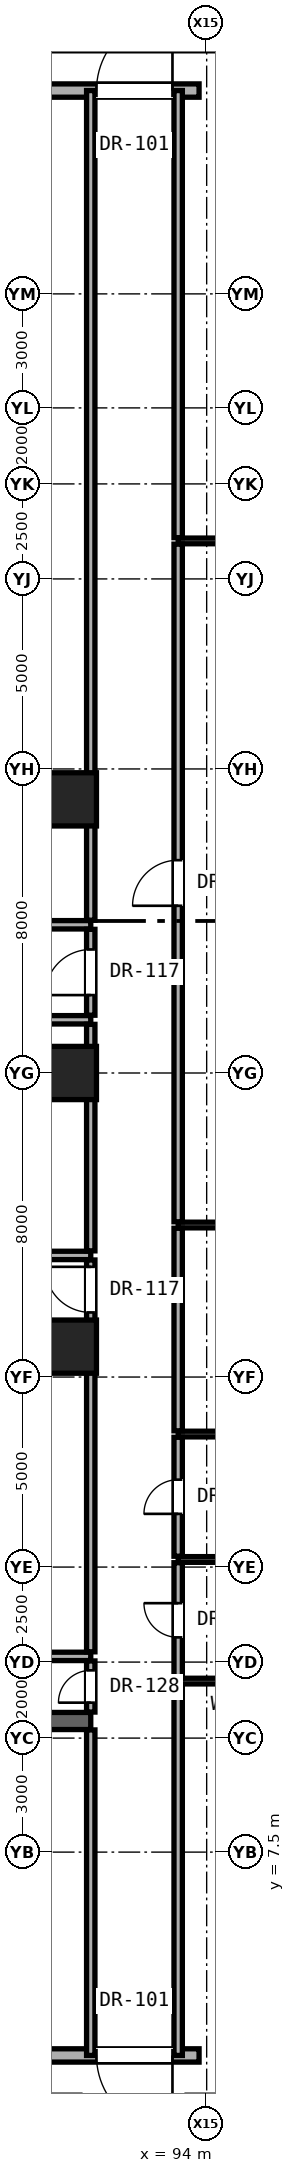
"""IFC4 building model, lengths in metres.
Left out: names, types, materials, properties, quantities, classifications, styles, units other than length and angle.
Written with IfcOpenShell. Run it as: python <this file> out.ifc"""

import sys

from ifc_helpers import new_model, si_unit, direction, frame, frame_2d, origin, origin_2d, place, context, subcontext, project, spatial, rectangle, hollow_rectangle, extrude, element, fill, save


model = new_model("IFC4")
c1 = context("Model", 3, precision=1e-05, world=origin(), true_north=direction((0.0, 1.0)))
c2 = subcontext(c1, "Body", "Model", "MODEL_VIEW")
j1 = project(units=[si_unit("LENGTHUNIT", "METRE"), si_unit("PLANEANGLEUNIT", "RADIAN")], contexts=[c1])
p1 = place(None, origin())
s1 = spatial("IfcSite", under=j1, at=p1, CompositionType="ELEMENT")
p2 = place(p1, origin())
s2 = spatial("IfcBuilding", under=s1, at=p2, CompositionType="ELEMENT")
p3 = place(p2, origin())
s3 = spatial("IfcBuildingStorey", under=s2, at=p3, CompositionType="ELEMENT", Elevation=0.0)
for number, where, z_axis, x_axis in (
    (1, (90.4, 20.8, 0.0), (0.0, 0.0, 1.0), (1.0, 0.0, 0.0)),
    (2, (90.4, 28.0, 0.0), (0.0, 0.0, 1.0), (1.0, 0.0, 0.0)),
    (3, (90.4, 35.2, 0.0), (0.0, 0.0, 1.0), (1.0, 0.0, 0.0)),
):
    element("IfcColumn", number, at=place(p3, frame(where, z_axis=z_axis, x_axis=x_axis)), inside=s3, PredefinedType="COLUMN", context=c2, shape_type="SweptSolid", body=[
        extrude(hollow_rectangle(XDim=1.4, YDim=1.4, WallThickness=0.08, at=origin_2d()), origin(), (0.0, 0.0, 1.0), 5.2),
    ])
p4 = place(p3, frame((93.8, 2.15, 0.0), z_axis=(0.0, 0.0, 1.0), x_axis=(-1.0, 0.0, 0.0)))
e4 = element("IfcWall", 4, at=p4, inside=s3, PredefinedType="SOLIDWALL", context=c2, shape_type="SweptSolid", body=[
    extrude(rectangle(XDim=29.4, YDim=0.35, at=frame_2d((14.7, 0.0))), origin(), (0.0, 0.0, 1.0), 4.86),
])
p5 = place(p4, frame((17.8, 0.0, 0.85)))
e5 = element("IfcOpeningElement", 5, at=p5, cuts=e4, PredefinedType="OPENING", context=c2, shape_type="SweptSolid", body=[
    extrude(rectangle(XDim=2.4, YDim=2.6, at=frame_2d((1.2, 1.3))), frame((0.0, 0.185, 0.0), z_axis=(0.0, -1.0, 0.0), x_axis=(1.0, 0.0, 0.0)), (0.0, 0.0, 1.0), 0.37),
])
p6 = place(p4, frame((21.0, 0.0, 0.85)))
e6 = element("IfcOpeningElement", 6, at=p6, cuts=e4, PredefinedType="OPENING", context=c2, shape_type="SweptSolid", body=[
    extrude(rectangle(XDim=1.8, YDim=2.4, at=frame_2d((0.9, 1.2))), frame((0.0, 0.185, 0.0), z_axis=(0.0, -1.0, 0.0), x_axis=(1.0, 0.0, 0.0)), (0.0, 0.0, 1.0), 0.37),
])
p7 = place(p4, frame((0.7, 0.0, 0.0)))
e7 = element("IfcOpeningElement", 7, at=p7, cuts=e4, PredefinedType="OPENING", context=c2, shape_type="SweptSolid", body=[
    extrude(rectangle(XDim=2.0, YDim=2.4, at=frame_2d((1.0, 1.2))), frame((0.0, 0.185, 0.0), z_axis=(0.0, -1.0, 0.0), x_axis=(1.0, 0.0, 0.0)), (0.0, 0.0, 1.0), 0.37),
])
p8 = place(p4, frame((11.0, 0.0, 0.0)))
e8 = element("IfcOpeningElement", 8, at=p8, cuts=e4, PredefinedType="OPENING", context=c2, shape_type="SweptSolid", body=[
    extrude(rectangle(XDim=1.8, YDim=2.5, at=frame_2d((0.9, 1.25))), frame((0.0, 0.185, 0.0), z_axis=(0.0, -1.0, 0.0), x_axis=(1.0, 0.0, 0.0)), (0.0, 0.0, 1.0), 0.37),
])
p9 = place(p4, frame((25.85, 0.0, 0.0)))
e9 = element("IfcOpeningElement", 9, at=p9, cuts=e4, PredefinedType="OPENING", context=c2, shape_type="SweptSolid", body=[
    extrude(rectangle(XDim=2.0, YDim=2.4, at=frame_2d((1.0, 1.2))), frame((0.0, 0.185, 0.0), z_axis=(0.0, -1.0, 0.0), x_axis=(1.0, 0.0, 0.0)), (0.0, 0.0, 1.0), 0.37),
])
p10 = place(p3, frame((66.2, 53.85, 0.0), z_axis=(0.0, 0.0, 1.0), x_axis=(1.0, 0.0, 0.0)))
e10 = element("IfcWall", 10, at=p10, inside=s3, PredefinedType="SOLIDWALL", context=c2, shape_type="SweptSolid", body=[
    extrude(rectangle(XDim=27.6, YDim=0.35, at=frame_2d((13.8, 0.0))), origin(), (0.0, 0.0, 1.0), 4.86),
])
p11 = place(p10, frame((10.0, 0.0, 0.85)))
e11 = element("IfcOpeningElement", 11, at=p11, cuts=e10, PredefinedType="OPENING", context=c2, shape_type="SweptSolid", body=[
    extrude(rectangle(XDim=1.8, YDim=2.4, at=frame_2d((0.9, 1.2))), frame((0.0, 0.185, 0.0), z_axis=(0.0, -1.0, 0.0), x_axis=(1.0, 0.0, 0.0)), (0.0, 0.0, 1.0), 0.37),
])
p12 = place(p10, frame((15.0, 0.0, 0.85)))
e12 = element("IfcOpeningElement", 12, at=p12, cuts=e10, PredefinedType="OPENING", context=c2, shape_type="SweptSolid", body=[
    extrude(rectangle(XDim=2.4, YDim=2.6, at=frame_2d((1.2, 1.3))), frame((0.0, 0.185, 0.0), z_axis=(0.0, -1.0, 0.0), x_axis=(1.0, 0.0, 0.0)), (0.0, 0.0, 1.0), 0.37),
])
p13 = place(p10, frame((5.8, 0.0, 0.0)))
e13 = element("IfcOpeningElement", 13, at=p13, cuts=e10, PredefinedType="OPENING", context=c2, shape_type="SweptSolid", body=[
    extrude(rectangle(XDim=2.0, YDim=2.4, at=frame_2d((1.0, 1.2))), frame((0.0, 0.185, 0.0), z_axis=(0.0, -1.0, 0.0), x_axis=(1.0, 0.0, 0.0)), (0.0, 0.0, 1.0), 0.37),
])
p14 = place(p10, frame((24.9, 0.0, 0.0)))
e14 = element("IfcOpeningElement", 14, at=p14, cuts=e10, PredefinedType="OPENING", context=c2, shape_type="SweptSolid", body=[
    extrude(rectangle(XDim=2.0, YDim=2.4, at=frame_2d((1.0, 1.2))), frame((0.0, 0.185, 0.0), z_axis=(0.0, -1.0, 0.0), x_axis=(1.0, 0.0, 0.0)), (0.0, 0.0, 1.0), 0.37),
])
p15 = place(p3, frame((61.8, 10.95, 0.0), z_axis=(0.0, 0.0, 1.0), x_axis=(1.0, 0.0, 0.0)))
e15 = element("IfcWall", 15, at=p15, inside=s3, PredefinedType="SHEAR", context=c2, shape_type="SweptSolid", body=[
    extrude(rectangle(XDim=29.15, YDim=0.45, at=frame_2d((14.575, 0.0))), origin(), (0.0, 0.0, 1.0), 4.88),
])
p16 = place(p15, frame((4.55, 0.0, 0.0)))
e16 = element("IfcOpeningElement", 16, at=p16, cuts=e15, PredefinedType="OPENING", context=c2, shape_type="SweptSolid", body=[
    extrude(rectangle(XDim=1.2, YDim=2.25, at=frame_2d((0.6, 1.125))), frame((0.0, 0.235, 0.0), z_axis=(0.0, -1.0, 0.0), x_axis=(1.0, 0.0, 0.0)), (0.0, 0.0, 1.0), 0.47),
])
p17 = place(p15, frame((7.57, 0.0, 0.0)))
e17 = element("IfcOpeningElement", 17, at=p17, cuts=e15, PredefinedType="OPENING", context=c2, shape_type="SweptSolid", body=[
    extrude(rectangle(XDim=1.15, YDim=2.2, at=frame_2d((0.575, 1.1))), frame((0.0, 0.235, 0.0), z_axis=(0.0, -1.0, 0.0), x_axis=(1.0, 0.0, 0.0)), (0.0, 0.0, 1.0), 0.47),
])
p18 = place(p15, frame((21.555, 0.0, 0.0)))
e18 = element("IfcOpeningElement", 18, at=p18, cuts=e15, PredefinedType="OPENING", context=c2, shape_type="SweptSolid", body=[
    extrude(rectangle(XDim=1.2, YDim=2.25, at=frame_2d((0.6, 1.125))), frame((0.0, 0.235, 0.0), z_axis=(0.0, -1.0, 0.0), x_axis=(1.0, 0.0, 0.0)), (0.0, 0.0, 1.0), 0.47),
])
p19 = place(p3, frame((93.25, 12.0, 0.0), z_axis=(0.0, 0.0, 1.0), x_axis=(1.0, 0.0, 0.0)))
e19 = element("IfcWall", 19, at=p19, inside=s3, PredefinedType="PARTITIONING", context=c2, shape_type="SweptSolid", body=[
    extrude(rectangle(XDim=3.55, YDim=0.15, at=frame_2d((1.775, 0.0))), origin(), (0.0, 0.0, 1.0), 4.88),
])
p20 = place(p3, frame((61.8, 12.65, 0.0), z_axis=(0.0, 0.0, 1.0), x_axis=(1.0, 0.0, 0.0)))
e20 = element("IfcWall", 20, at=p20, inside=s3, PredefinedType="SOLIDWALL", context=c2, shape_type="SweptSolid", body=[
    extrude(rectangle(XDim=29.15, YDim=0.22, at=frame_2d((14.575, 0.0))), origin(), (0.0, 0.0, 1.0), 4.016),
])
for number, where, z_axis, x_axis in (
    (21, (93.25, 15.2, 0.0), (0.0, 0.0, 1.0), (1.0, 0.0, 0.0)),
    (22, (93.25, 18.5, 0.0), (0.0, 0.0, 1.0), (1.0, 0.0, 0.0)),
):
    element("IfcWall", number, at=place(p3, frame(where, z_axis=z_axis, x_axis=x_axis)), inside=s3, PredefinedType="PARTITIONING", context=c2, shape_type="SweptSolid", body=[
        extrude(rectangle(XDim=3.55, YDim=0.15, at=frame_2d((1.775, 0.0))), origin(), (0.0, 0.0, 1.0), 4.016),
    ])
p21 = place(p3, frame((85.37, 20.8, 0.0), z_axis=(0.0, 0.0, 1.0), x_axis=(1.0, 0.0, 0.0)))
e23 = element("IfcWall", 23, at=p21, inside=s3, PredefinedType="SOLIDWALL", context=c2, shape_type="SweptSolid", body=[
    extrude(rectangle(XDim=5.58, YDim=0.22, at=frame_2d((2.79, 0.0))), origin(), (0.0, 0.0, 1.0), 3.772),
])
p22 = place(p3, frame((61.8, 23.2, 0.0), z_axis=(0.0, 0.0, 1.0), x_axis=(1.0, 0.0, 0.0)))
e24 = element("IfcWall", 24, at=p22, inside=s3, PredefinedType="SOLIDWALL", context=c2, shape_type="SweptSolid", body=[
    extrude(rectangle(XDim=29.15, YDim=0.22, at=frame_2d((14.575, 0.0))), origin(), (0.0, 0.0, 1.0), 3.945),
])
p23 = place(p22, frame((6.225, 0.0, 0.0)))
e25 = element("IfcOpeningElement", 25, at=p23, cuts=e24, PredefinedType="OPENING", context=c2, shape_type="SweptSolid", body=[
    extrude(rectangle(XDim=0.9, YDim=2.1, at=frame_2d((0.45, 1.05))), frame((0.0, 0.12, 0.0), z_axis=(0.0, -1.0, 0.0), x_axis=(1.0, 0.0, 0.0)), (0.0, 0.0, 1.0), 0.24),
])
p24 = place(p22, frame((15.075, 0.0, 0.0)))
e26 = element("IfcOpeningElement", 26, at=p24, cuts=e24, PredefinedType="OPENING", context=c2, shape_type="SweptSolid", body=[
    extrude(rectangle(XDim=1.2, YDim=2.25, at=frame_2d((0.6, 1.125))), frame((0.0, 0.12, 0.0), z_axis=(0.0, -1.0, 0.0), x_axis=(1.0, 0.0, 0.0)), (0.0, 0.0, 1.0), 0.24),
])
p25 = place(p3, frame((93.25, 24.0, 0.0), z_axis=(0.0, 0.0, 1.0), x_axis=(1.0, 0.0, 0.0)))
e27 = element("IfcWall", 27, at=p25, inside=s3, PredefinedType="PARTITIONING", context=c2, shape_type="SweptSolid", body=[
    extrude(rectangle(XDim=4.15, YDim=0.15, at=frame_2d((2.075, 0.0))), origin(), (0.0, 0.0, 1.0), 4.016),
])
p26 = place(p3, frame((85.22, 29.4, 0.0), z_axis=(0.0, 0.0, 1.0), x_axis=(1.0, 0.0, 0.0)))
e28 = element("IfcWall", 28, at=p26, inside=s3, PredefinedType="SOLIDWALL", context=c2, shape_type="SweptSolid", body=[
    extrude(rectangle(XDim=5.73, YDim=0.22, at=frame_2d((2.865, 0.0))), origin(), (0.0, 0.0, 1.0), 4.016),
])
p27 = place(p3, frame((61.8, 31.9, 0.0), z_axis=(0.0, 0.0, 1.0), x_axis=(1.0, 0.0, 0.0)))
e29 = element("IfcWall", 29, at=p27, inside=s3, PredefinedType="SOLIDWALL", context=c2, shape_type="SweptSolid", body=[
    extrude(rectangle(XDim=29.15, YDim=0.22, at=frame_2d((14.575, 0.0))), origin(), (0.0, 0.0, 1.0), 3.945),
])
p28 = place(p27, frame((7.6, 0.0, 0.0)))
e30 = element("IfcOpeningElement", 30, at=p28, cuts=e29, PredefinedType="OPENING", context=c2, shape_type="SweptSolid", body=[
    extrude(rectangle(XDim=1.2, YDim=2.25, at=frame_2d((0.6, 1.125))), frame((0.0, 0.12, 0.0), z_axis=(0.0, -1.0, 0.0), x_axis=(1.0, 0.0, 0.0)), (0.0, 0.0, 1.0), 0.24),
])
p29 = place(p27, frame((20.26, 0.0, 0.0)))
e31 = element("IfcOpeningElement", 31, at=p29, cuts=e29, PredefinedType="OPENING", context=c2, shape_type="SweptSolid", body=[
    extrude(rectangle(XDim=1.2, YDim=2.25, at=frame_2d((0.6, 1.125))), frame((0.0, 0.12, 0.0), z_axis=(0.0, -1.0, 0.0), x_axis=(1.0, 0.0, 0.0)), (0.0, 0.0, 1.0), 0.24),
])
p30 = place(p27, frame((15.64, 0.0, 0.0)))
e32 = element("IfcOpeningElement", 32, at=p30, cuts=e29, PredefinedType="OPENING", context=c2, shape_type="SweptSolid", body=[
    extrude(rectangle(XDim=1.2, YDim=2.25, at=frame_2d((0.6, 1.125))), frame((0.0, 0.12, 0.0), z_axis=(0.0, -1.0, 0.0), x_axis=(1.0, 0.0, 0.0)), (0.0, 0.0, 1.0), 0.24),
])
p31 = place(p3, frame((93.25, 42.0, 0.0), z_axis=(0.0, 0.0, 1.0), x_axis=(1.0, 0.0, 0.0)))
e33 = element("IfcWall", 33, at=p31, inside=s3, PredefinedType="PARTITIONING", context=c2, shape_type="SweptSolid", body=[
    extrude(rectangle(XDim=4.15, YDim=0.15, at=frame_2d((2.075, 0.0))), origin(), (0.0, 0.0, 1.0), 4.88),
])
p32 = place(p3, frame((90.95, 2.15, 0.0), z_axis=(0.0, 0.0, 1.0), x_axis=(0.0, 1.0, 0.0)))
e34 = element("IfcWall", 34, at=p32, inside=s3, PredefinedType="SOLIDWALL", context=c2, shape_type="SweptSolid", body=[
    extrude(rectangle(XDim=8.565, YDim=0.22, at=frame_2d((4.283, 0.0))), origin(), (0.0, 0.0, 1.0), 4.88),
])
p33 = place(p3, frame((90.95, 11.185, 0.0), z_axis=(0.0, 0.0, 1.0), x_axis=(0.0, 1.0, 0.0)))
e35 = element("IfcWall", 35, at=p33, inside=s3, PredefinedType="SOLIDWALL", context=c2, shape_type="SweptSolid", body=[
    extrude(rectangle(XDim=1.345, YDim=0.22, at=frame_2d((0.672, 0.0))), origin(), (0.0, 0.0, 1.0), 4.88),
])
p34 = place(p33, frame((0.248, 0.0, 0.0)))
e36 = element("IfcOpeningElement", 36, at=p34, cuts=e35, PredefinedType="OPENING", context=c2, shape_type="SweptSolid", body=[
    extrude(rectangle(XDim=0.85, YDim=2.01, at=frame_2d((0.425, 1.005))), frame((0.0, 0.12, 0.0), z_axis=(0.0, -1.0, 0.0), x_axis=(1.0, 0.0, 0.0)), (0.0, 0.0, 1.0), 0.24),
])
p35 = place(p3, frame((90.95, 12.77, 0.0), z_axis=(0.0, 0.0, 1.0), x_axis=(0.0, 1.0, 0.0)))
e37 = element("IfcWall", 37, at=p35, inside=s3, PredefinedType="SOLIDWALL", context=c2, shape_type="SweptSolid", body=[
    extrude(rectangle(XDim=7.91, YDim=0.22, at=frame_2d((3.955, 0.0))), origin(), (0.0, 0.0, 1.0), 4.016),
])
p36 = place(p3, frame((90.95, 20.92, 0.0), z_axis=(0.0, 0.0, 1.0), x_axis=(0.0, 1.0, 0.0)))
e38 = element("IfcWall", 38, at=p36, inside=s3, PredefinedType="SOLIDWALL", context=c2, shape_type="SweptSolid", body=[
    extrude(rectangle(XDim=2.16, YDim=0.22, at=frame_2d((1.08, 0.0))), origin(), (0.0, 0.0, 1.0), 4.88),
])
p37 = place(p36, frame((0.78, 0.0, 0.0)))
e39 = element("IfcOpeningElement", 39, at=p37, cuts=e38, PredefinedType="OPENING", context=c2, shape_type="SweptSolid", body=[
    extrude(rectangle(XDim=1.2, YDim=2.25, at=frame_2d((0.6, 1.125))), frame((0.0, 0.12, 0.0), z_axis=(0.0, -1.0, 0.0), x_axis=(1.0, 0.0, 0.0)), (0.0, 0.0, 1.0), 0.24),
])
p38 = place(p3, frame((90.95, 23.32, 0.0), z_axis=(0.0, 0.0, 1.0), x_axis=(0.0, 1.0, 0.0)))
e40 = element("IfcWall", 40, at=p38, inside=s3, PredefinedType="SOLIDWALL", context=c2, shape_type="SweptSolid", body=[
    extrude(rectangle(XDim=5.96, YDim=0.22, at=frame_2d((2.98, 0.0))), origin(), (0.0, 0.0, 1.0), 4.099),
])
p39 = place(p3, frame((90.95, 29.52, 0.0), z_axis=(0.0, 0.0, 1.0), x_axis=(0.0, 1.0, 0.0)))
e41 = element("IfcWall", 41, at=p39, inside=s3, PredefinedType="SOLIDWALL", context=c2, shape_type="SweptSolid", body=[
    extrude(rectangle(XDim=2.26, YDim=0.22, at=frame_2d((1.13, 0.0))), origin(), (0.0, 0.0, 1.0), 4.88),
])
p40 = place(p39, frame((0.53, 0.0, 0.0)))
e42 = element("IfcOpeningElement", 42, at=p40, cuts=e41, PredefinedType="OPENING", context=c2, shape_type="SweptSolid", body=[
    extrude(rectangle(XDim=1.2, YDim=2.25, at=frame_2d((0.6, 1.125))), frame((0.0, 0.12, 0.0), z_axis=(0.0, -1.0, 0.0), x_axis=(1.0, 0.0, 0.0)), (0.0, 0.0, 1.0), 0.24),
])
p41 = place(p3, frame((90.95, 32.02, 0.0), z_axis=(0.0, 0.0, 1.0), x_axis=(0.0, 1.0, 0.0)))
e43 = element("IfcWall", 43, at=p41, inside=s3, PredefinedType="SOLIDWALL", context=c2, shape_type="SweptSolid", body=[
    extrude(rectangle(XDim=21.83, YDim=0.22, at=frame_2d((10.915, 0.0))), origin(), (0.0, 0.0, 1.0), 4.016),
])
p42 = place(p3, frame((93.25, 2.15, 0.0), z_axis=(0.0, 0.0, 1.0), x_axis=(0.0, 1.0, 0.0)))
e44 = element("IfcWall", 44, at=p42, inside=s3, PredefinedType="SOLIDWALL", context=c2, shape_type="SweptSolid", body=[
    extrude(rectangle(XDim=9.765, YDim=0.22, at=frame_2d((4.883, 0.0))), origin(), (0.0, 0.0, 1.0), 4.88),
])
p43 = place(p3, frame((93.25, 12.085, 0.0), z_axis=(0.0, 0.0, 1.0), x_axis=(0.0, 1.0, 0.0)))
e45 = element("IfcWall", 45, at=p43, inside=s3, PredefinedType="SOLIDWALL", context=c2, shape_type="SweptSolid", body=[
    extrude(rectangle(XDim=3.03, YDim=0.22, at=frame_2d((1.515, 0.0))), origin(), (0.0, 0.0, 1.0), 4.016),
])
p44 = place(p43, frame((1.065, 0.0, 0.0)))
e46 = element("IfcOpeningElement", 46, at=p44, cuts=e45, PredefinedType="OPENING", context=c2, shape_type="SweptSolid", body=[
    extrude(rectangle(XDim=0.9, YDim=2.1, at=frame_2d((0.45, 1.05))), frame((0.0, 0.12, 0.0), z_axis=(0.0, -1.0, 0.0), x_axis=(1.0, 0.0, 0.0)), (0.0, 0.0, 1.0), 0.24),
])
p45 = place(p3, frame((93.25, 15.285, 0.0), z_axis=(0.0, 0.0, 1.0), x_axis=(0.0, 1.0, 0.0)))
e47 = element("IfcWall", 47, at=p45, inside=s3, PredefinedType="SOLIDWALL", context=c2, shape_type="SweptSolid", body=[
    extrude(rectangle(XDim=3.13, YDim=0.22, at=frame_2d((1.565, 0.0))), origin(), (0.0, 0.0, 1.0), 4.016),
])
p46 = place(p45, frame((1.115, 0.0, 0.0)))
e48 = element("IfcOpeningElement", 48, at=p46, cuts=e47, PredefinedType="OPENING", context=c2, shape_type="SweptSolid", body=[
    extrude(rectangle(XDim=0.9, YDim=2.1, at=frame_2d((0.45, 1.05))), frame((0.0, 0.12, 0.0), z_axis=(0.0, -1.0, 0.0), x_axis=(1.0, 0.0, 0.0)), (0.0, 0.0, 1.0), 0.24),
])
p47 = place(p3, frame((93.25, 18.585, 0.0), z_axis=(0.0, 0.0, 1.0), x_axis=(0.0, 1.0, 0.0)))
e49 = element("IfcWall", 49, at=p47, inside=s3, PredefinedType="SOLIDWALL", context=c2, shape_type="SweptSolid", body=[
    extrude(rectangle(XDim=5.33, YDim=0.22, at=frame_2d((2.665, 0.0))), origin(), (0.0, 0.0, 1.0), 4.88),
])
p48 = place(p3, frame((93.25, 24.085, 0.0), z_axis=(0.0, 0.0, 1.0), x_axis=(0.0, 1.0, 0.0)))
e50 = element("IfcWall", 50, at=p48, inside=s3, PredefinedType="SOLIDWALL", context=c2, shape_type="SweptSolid", body=[
    extrude(rectangle(XDim=17.83, YDim=0.22, at=frame_2d((8.915, 0.0))), origin(), (0.0, 0.0, 1.0), 4.016),
])
p49 = place(p48, frame((8.315, 0.0, 0.0)))
e51 = element("IfcOpeningElement", 51, at=p49, cuts=e50, PredefinedType="OPENING", context=c2, shape_type="SweptSolid", body=[
    extrude(rectangle(XDim=1.2, YDim=2.25, at=frame_2d((0.6, 1.125))), frame((0.0, 0.12, 0.0), z_axis=(0.0, -1.0, 0.0), x_axis=(1.0, 0.0, 0.0)), (0.0, 0.0, 1.0), 0.24),
])
p50 = place(p3, frame((93.25, 42.085, 0.0), z_axis=(0.0, 0.0, 1.0), x_axis=(0.0, 1.0, 0.0)))
e52 = element("IfcWall", 52, at=p50, inside=s3, PredefinedType="SOLIDWALL", context=c2, shape_type="SweptSolid", body=[
    extrude(rectangle(XDim=11.765, YDim=0.22, at=frame_2d((5.883, 0.0))), origin(), (0.0, 0.0, 1.0), 4.88),
])
p51 = place(p7, origin())
e53 = element("IfcDoor", 53, at=p51, inside=s3, OperationType="SINGLE_SWING_LEFT", PredefinedType="DOOR", context=c2, shape_type="SweptSolid", body=[
    extrude(rectangle(XDim=2.0, YDim=2.4, at=frame_2d((1.0, 1.2))), frame((0.0, 0.025, 0.0), z_axis=(0.0, -1.0, 0.0), x_axis=(1.0, 0.0, 0.0)), (0.0, 0.0, 1.0), 0.05),
])
fill(e7, e53)
p52 = place(p14, origin())
e54 = element("IfcDoor", 54, at=p52, inside=s3, OperationType="SINGLE_SWING_RIGHT", PredefinedType="DOOR", context=c2, shape_type="SweptSolid", body=[
    extrude(rectangle(XDim=2.0, YDim=2.4, at=frame_2d((1.0, 1.2))), frame((0.0, 0.025, 0.0), z_axis=(0.0, -1.0, 0.0), x_axis=(1.0, 0.0, 0.0)), (0.0, 0.0, 1.0), 0.05),
])
fill(e14, e54)
p53 = place(p37, origin())
e55 = element("IfcDoor", 55, at=p53, inside=s3, OperationType="SINGLE_SWING_RIGHT", PredefinedType="DOOR", context=c2, shape_type="SweptSolid", body=[
    extrude(rectangle(XDim=1.2, YDim=2.25, at=frame_2d((0.6, 1.125))), frame((0.0, 0.025, 0.0), z_axis=(0.0, -1.0, 0.0), x_axis=(1.0, 0.0, 0.0)), (0.0, 0.0, 1.0), 0.05),
])
fill(e39, e55)
p54 = place(p40, origin())
e56 = element("IfcDoor", 56, at=p54, inside=s3, OperationType="SINGLE_SWING_LEFT", PredefinedType="DOOR", context=c2, shape_type="SweptSolid", body=[
    extrude(rectangle(XDim=1.2, YDim=2.25, at=frame_2d((0.6, 1.125))), frame((0.0, 0.025, 0.0), z_axis=(0.0, -1.0, 0.0), x_axis=(1.0, 0.0, 0.0)), (0.0, 0.0, 1.0), 0.05),
])
fill(e42, e56)
p55 = place(p34, origin())
e57 = element("IfcDoor", 57, at=p55, inside=s3, OperationType="SINGLE_SWING_LEFT", PredefinedType="DOOR", context=c2, shape_type="SweptSolid", body=[
    extrude(rectangle(XDim=0.85, YDim=2.01, at=frame_2d((0.425, 1.005))), frame((0.0, 0.025, 0.0), z_axis=(0.0, -1.0, 0.0), x_axis=(1.0, 0.0, 0.0)), (0.0, 0.0, 1.0), 0.05),
])
fill(e36, e57)
p56 = place(p49, origin())
e58 = element("IfcDoor", 58, at=p56, inside=s3, OperationType="SINGLE_SWING_LEFT", PredefinedType="DOOR", context=c2, shape_type="SweptSolid", body=[
    extrude(rectangle(XDim=1.2, YDim=2.25, at=frame_2d((0.6, 1.125))), frame((0.0, 0.025, 0.0), z_axis=(0.0, -1.0, 0.0), x_axis=(1.0, 0.0, 0.0)), (0.0, 0.0, 1.0), 0.05),
])
fill(e51, e58)
p57 = place(p44, origin())
e59 = element("IfcDoor", 59, at=p57, inside=s3, OperationType="SINGLE_SWING_RIGHT", PredefinedType="DOOR", context=c2, shape_type="SweptSolid", body=[
    extrude(rectangle(XDim=0.9, YDim=2.1, at=frame_2d((0.45, 1.05))), frame((0.0, 0.025, 0.0), z_axis=(0.0, -1.0, 0.0), x_axis=(1.0, 0.0, 0.0)), (0.0, 0.0, 1.0), 0.05),
])
fill(e46, e59)
p58 = place(p46, origin())
e60 = element("IfcDoor", 60, at=p58, inside=s3, OperationType="SINGLE_SWING_LEFT", PredefinedType="DOOR", context=c2, shape_type="SweptSolid", body=[
    extrude(rectangle(XDim=0.9, YDim=2.1, at=frame_2d((0.45, 1.05))), frame((0.0, 0.025, 0.0), z_axis=(0.0, -1.0, 0.0), x_axis=(1.0, 0.0, 0.0)), (0.0, 0.0, 1.0), 0.05),
])
fill(e48, e60)
save(model, sys.argv[1])
